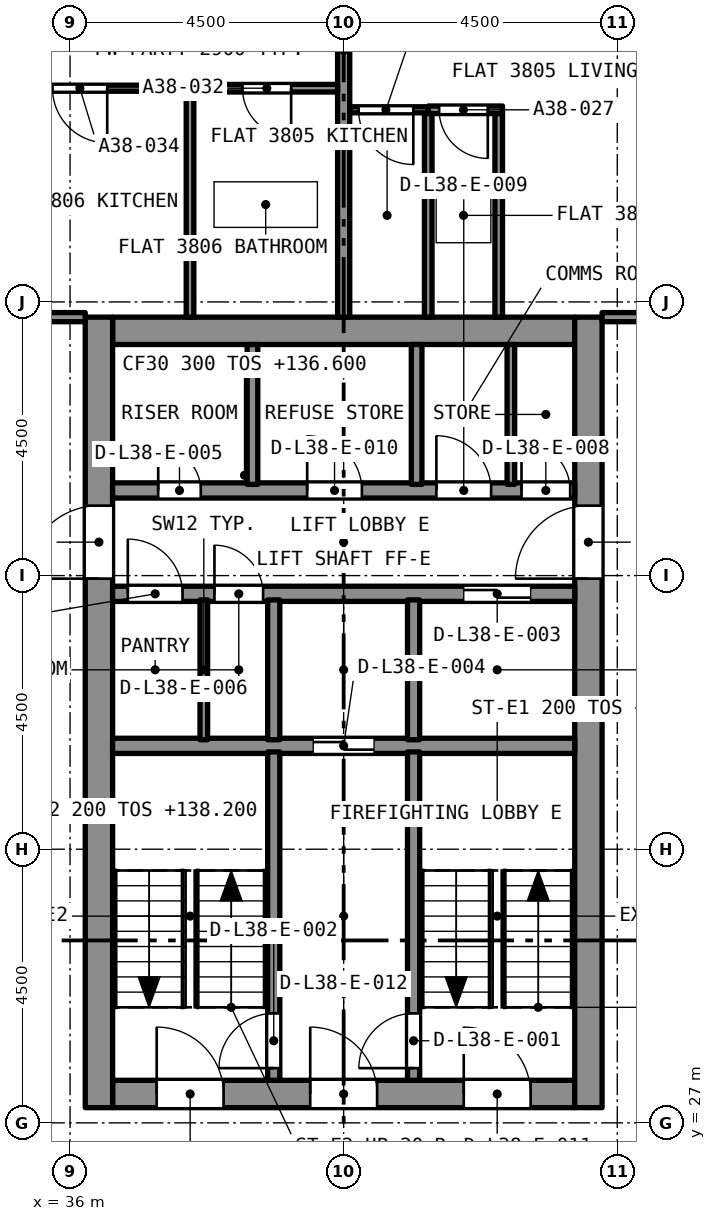
"""IFC4 building model, lengths in metres.
Left out: names, types, materials, properties, quantities, classifications, styles, units other than length and angle.
Written with IfcOpenShell. Run it as: python <this file> out.ifc"""

import sys

from ifc_helpers import new_model, si_unit, direction, frame, frame_2d, origin, place, context, subcontext, project, spatial, rectangle, extrude, element, fill, save


model = new_model("IFC4")
c1 = context("Model", 3, precision=1e-05, world=origin(), true_north=direction((0.0, 1.0)))
c2 = subcontext(c1, "Body", "Model", "MODEL_VIEW")
j1 = project(units=[si_unit("LENGTHUNIT", "METRE"), si_unit("PLANEANGLEUNIT", "RADIAN")], contexts=[c1])
p1 = place(None, origin())
s1 = spatial("IfcSite", under=j1, at=p1, CompositionType="ELEMENT")
p2 = place(p1, origin())
s2 = spatial("IfcBuilding", under=s1, at=p2, CompositionType="ELEMENT")
p3 = place(p2, frame((0.0, 0.0, 136.6)))
s3 = spatial("IfcBuildingStorey", under=s2, at=p3, CompositionType="ELEMENT", Elevation=136.6)
p4 = place(p3, frame((36.7, 27.475, 0.0), z_axis=(0.0, 0.0, 1.0), x_axis=(1.0, 0.0, 0.0)))
e1 = element("IfcWall", 1, at=p4, inside=s3, PredefinedType="SOLIDWALL", context=c2, shape_type="SweptSolid", body=[
    extrude(rectangle(XDim=7.6, YDim=0.45, at=frame_2d((3.8, 0.0))), origin(), (0.0, 0.0, 1.0), 3.2),
])
p5 = place(p4, frame((5.775, 0.0, 0.0)))
e2 = element("IfcOpeningElement", 2, at=p5, cuts=e1, PredefinedType="OPENING", context=c2, shape_type="SweptSolid", body=[
    extrude(rectangle(XDim=1.1, YDim=2.1, at=frame_2d((0.55, 1.05))), frame((0.0, 0.235, 0.0), z_axis=(0.0, -1.0, 0.0), x_axis=(1.0, 0.0, 0.0)), (0.0, 0.0, 1.0), 0.47),
])
p6 = place(p4, frame((3.25, 0.0, 0.0)))
e3 = element("IfcOpeningElement", 3, at=p6, cuts=e1, PredefinedType="OPENING", context=c2, shape_type="SweptSolid", body=[
    extrude(rectangle(XDim=1.1, YDim=2.1, at=frame_2d((0.55, 1.05))), frame((0.0, 0.235, 0.0), z_axis=(0.0, -1.0, 0.0), x_axis=(1.0, 0.0, 0.0)), (0.0, 0.0, 1.0), 0.47),
])
p7 = place(p4, frame((0.725, 0.0, 0.0)))
e4 = element("IfcOpeningElement", 4, at=p7, cuts=e1, PredefinedType="OPENING", context=c2, shape_type="SweptSolid", body=[
    extrude(rectangle(XDim=1.1, YDim=2.1, at=frame_2d((0.55, 1.05))), frame((0.0, 0.235, 0.0), z_axis=(0.0, -1.0, 0.0), x_axis=(1.0, 0.0, 0.0)), (0.0, 0.0, 1.0), 0.47),
])
p8 = place(p3, frame((36.7, 40.025, 0.0), z_axis=(0.0, 0.0, 1.0), x_axis=(1.0, 0.0, 0.0)))
e5 = element("IfcWall", 5, at=p8, inside=s3, PredefinedType="SOLIDWALL", context=c2, shape_type="SweptSolid", body=[
    extrude(rectangle(XDim=7.6, YDim=0.45, at=frame_2d((3.8, 0.0))), origin(), (0.0, 0.0, 1.0), 3.2),
])
p9 = place(p3, frame((36.475, 27.25, 0.0), z_axis=(0.0, 0.0, 1.0), x_axis=(0.0, 1.0, 0.0)))
e6 = element("IfcWall", 6, at=p9, inside=s3, PredefinedType="SOLIDWALL", context=c2, shape_type="SweptSolid", body=[
    extrude(rectangle(XDim=13.0, YDim=0.45, at=frame_2d((6.5, 0.0))), origin(), (0.0, 0.0, 1.0), 3.2),
])
p10 = place(p9, frame((8.7, 0.0, 0.0)))
e7 = element("IfcOpeningElement", 7, at=p10, cuts=e6, PredefinedType="OPENING", context=c2, shape_type="SweptSolid", body=[
    extrude(rectangle(XDim=1.2, YDim=2.1, at=frame_2d((0.6, 1.05))), frame((0.0, 0.235, 0.0), z_axis=(0.0, -1.0, 0.0), x_axis=(1.0, 0.0, 0.0)), (0.0, 0.0, 1.0), 0.47),
])
p11 = place(p3, frame((44.525, 27.25, 0.0), z_axis=(0.0, 0.0, 1.0), x_axis=(0.0, 1.0, 0.0)))
e8 = element("IfcWall", 8, at=p11, inside=s3, PredefinedType="SOLIDWALL", context=c2, shape_type="SweptSolid", body=[
    extrude(rectangle(XDim=13.0, YDim=0.45, at=frame_2d((6.5, 0.0))), origin(), (0.0, 0.0, 1.0), 3.2),
])
p12 = place(p11, frame((8.7, 0.0, 0.0)))
e9 = element("IfcOpeningElement", 9, at=p12, cuts=e8, PredefinedType="OPENING", context=c2, shape_type="SweptSolid", body=[
    extrude(rectangle(XDim=1.2, YDim=2.1, at=frame_2d((0.6, 1.05))), frame((0.0, 0.235, 0.0), z_axis=(0.0, -1.0, 0.0), x_axis=(1.0, 0.0, 0.0)), (0.0, 0.0, 1.0), 0.47),
])
p13 = place(p3, frame((43.113, 43.66, 0.0), z_axis=(0.0, 0.0, 1.0), x_axis=(-1.0, 0.0, 0.0)))
e10 = element("IfcWall", 10, at=p13, inside=s3, PredefinedType="PARTITIONING", context=c2, shape_type="SweptSolid", body=[
    extrude(rectangle(XDim=1.222, YDim=0.125, at=frame_2d((0.611, 0.0))), origin(), (0.0, 0.0, 1.0), 2.9),
])
p14 = place(p13, frame((0.242, 0.0, 0.0)))
e11 = element("IfcOpeningElement", 11, at=p14, cuts=e10, PredefinedType="OPENING", context=c2, shape_type="SweptSolid", body=[
    extrude(rectangle(XDim=0.8, YDim=2.1, at=frame_2d((0.4, 1.05))), frame((0.0, 0.073, 0.0), z_axis=(0.0, -1.0, 0.0), x_axis=(1.0, 0.0, 0.0)), (0.0, 0.0, 1.0), 0.145),
])
for number, where, z_axis, x_axis in (
    (12, (43.05, 40.25, 0.0), (0.0, 0.0, 1.0), (0.0, 1.0, 0.0)),
    (13, (41.891, 40.25, 0.0), (0.0, 0.0, 1.0), (0.0, 1.0, 0.0)),
):
    element("IfcWall", number, at=place(p3, frame(where, z_axis=z_axis, x_axis=x_axis)), inside=s3, PredefinedType="PARTITIONING", context=c2, shape_type="SweptSolid", body=[
        extrude(rectangle(XDim=3.347, YDim=0.125, at=frame_2d((1.674, 0.0))), origin(), (0.0, 0.0, 1.0), 2.9),
    ])
p15 = place(p3, frame((41.891, 43.66, 0.0), z_axis=(0.0, 0.0, 1.0), x_axis=(-1.0, 0.0, 0.0)))
e14 = element("IfcWall", 14, at=p15, inside=s3, PredefinedType="PARTITIONING", context=c2, shape_type="SweptSolid", body=[
    extrude(rectangle(XDim=1.291, YDim=0.1, at=frame_2d((0.646, 0.0))), origin(), (0.0, 0.0, 1.0), 2.9),
])
p16 = place(p15, frame((0.246, 0.0, 0.0)))
e15 = element("IfcOpeningElement", 15, at=p16, cuts=e14, PredefinedType="OPENING", context=c2, shape_type="SweptSolid", body=[
    extrude(rectangle(XDim=0.9, YDim=2.1, at=frame_2d((0.45, 1.05))), frame((0.0, 0.06, 0.0), z_axis=(0.0, -1.0, 0.0), x_axis=(1.0, 0.0, 0.0)), (0.0, 0.0, 1.0), 0.12),
])
p17 = place(p3, frame((44.75, 40.25, 0.0), z_axis=(0.0, 0.0, 1.0), x_axis=(1.0, 0.0, 0.0)))
e16 = element("IfcWall", 16, at=p17, inside=s3, PredefinedType="PARTITIONING", context=c2, shape_type="SweptSolid", body=[
    extrude(rectangle(XDim=4.275, YDim=0.15, at=frame_2d((2.137, 0.0))), origin(), (0.0, 0.0, 1.0), 2.9),
])
p18 = place(p17, frame((2.0, 0.0, 0.0)))
e17 = element("IfcOpeningElement", 17, at=p18, cuts=e16, PredefinedType="OPENING", context=c2, shape_type="SweptSolid", body=[
    extrude(rectangle(XDim=1.0, YDim=2.1, at=frame_2d((0.5, 1.05))), frame((0.0, 0.085, 0.0), z_axis=(0.0, -1.0, 0.0), x_axis=(1.0, 0.0, 0.0)), (0.0, 0.0, 1.0), 0.17),
])
p19 = place(p3, frame((40.5, 40.25, 0.0), z_axis=(0.0, 0.0, 1.0), x_axis=(0.0, 1.0, 0.0)))
e18 = element("IfcWall", 18, at=p19, inside=s3, PredefinedType="PARTITIONING", context=c2, shape_type="SweptSolid", body=[
    extrude(rectangle(XDim=8.775, YDim=0.2, at=frame_2d((4.387, 0.0))), origin(), (0.0, 0.0, 1.0), 2.9),
])
p20 = place(p3, frame((40.4, 44.015, 0.0), z_axis=(0.0, 0.0, 1.0), x_axis=(-1.0, 0.0, 0.0)))
e19 = element("IfcWall", 19, at=p20, inside=s3, PredefinedType="PARTITIONING", context=c2, shape_type="SweptSolid", body=[
    extrude(rectangle(XDim=2.427, YDim=0.125, at=frame_2d((1.214, 0.0))), origin(), (0.0, 0.0, 1.0), 2.9),
])
p21 = place(p20, frame((0.764, 0.0, 0.0)))
e20 = element("IfcOpeningElement", 20, at=p21, cuts=e19, PredefinedType="OPENING", context=c2, shape_type="SweptSolid", body=[
    extrude(rectangle(XDim=0.8, YDim=2.1, at=frame_2d((0.4, 1.05))), frame((0.0, 0.073, 0.0), z_axis=(0.0, -1.0, 0.0), x_axis=(1.0, 0.0, 0.0)), (0.0, 0.0, 1.0), 0.145),
])
p22 = place(p3, frame((37.973, 40.25, 0.0), z_axis=(0.0, 0.0, 1.0), x_axis=(0.0, 1.0, 0.0)))
e21 = element("IfcWall", 21, at=p22, inside=s3, PredefinedType="PARTITIONING", context=c2, shape_type="SweptSolid", body=[
    extrude(rectangle(XDim=3.702, YDim=0.125, at=frame_2d((1.851, 0.0))), origin(), (0.0, 0.0, 1.0), 2.9),
])
p23 = place(p3, frame((37.973, 44.015, 0.0), z_axis=(0.0, 0.0, 1.0), x_axis=(-1.0, 0.0, 0.0)))
e22 = element("IfcWall", 22, at=p23, inside=s3, PredefinedType="PARTITIONING", context=c2, shape_type="SweptSolid", body=[
    extrude(rectangle(XDim=3.673, YDim=0.1, at=frame_2d((1.836, 0.0))), origin(), (0.0, 0.0, 1.0), 2.9),
])
p24 = place(p23, frame((1.361, 0.0, 0.0)))
e23 = element("IfcOpeningElement", 23, at=p24, cuts=e22, PredefinedType="OPENING", context=c2, shape_type="SweptSolid", body=[
    extrude(rectangle(XDim=0.9, YDim=2.1, at=frame_2d((0.45, 1.05))), frame((0.0, 0.06, 0.0), z_axis=(0.0, -1.0, 0.0), x_axis=(1.0, 0.0, 0.0)), (0.0, 0.0, 1.0), 0.12),
])
p25 = place(p3, frame((34.35, 40.25, 0.0), z_axis=(0.0, 0.0, 1.0), x_axis=(1.0, 0.0, 0.0)))
e24 = element("IfcWall", 24, at=p25, inside=s3, PredefinedType="PARTITIONING", context=c2, shape_type="SweptSolid", body=[
    extrude(rectangle(XDim=1.9, YDim=0.15, at=frame_2d((0.95, 0.0))), origin(), (0.0, 0.0, 1.0), 2.9),
])
p26 = place(p3, frame((36.7, 33.2, 0.0), z_axis=(0.0, 0.0, 1.0), x_axis=(1.0, 0.0, 0.0)))
e25 = element("IfcWall", 25, at=p26, inside=s3, PredefinedType="SOLIDWALL", context=c2, shape_type="SweptSolid", body=[
    extrude(rectangle(XDim=7.6, YDim=0.25, at=frame_2d((3.8, 0.0))), origin(), (0.0, 0.0, 1.0), 2.9),
])
p27 = place(p26, frame((3.3, 0.0, 0.0)))
e26 = element("IfcOpeningElement", 26, at=p27, cuts=e25, PredefinedType="OPENING", context=c2, shape_type="SweptSolid", body=[
    extrude(rectangle(XDim=1.0, YDim=2.1, at=frame_2d((0.5, 1.05))), frame((0.0, 0.135, 0.0), z_axis=(0.0, -1.0, 0.0), x_axis=(1.0, 0.0, 0.0)), (0.0, 0.0, 1.0), 0.27),
])
p28 = place(p3, frame((36.7, 35.7, 0.0), z_axis=(0.0, 0.0, 1.0), x_axis=(1.0, 0.0, 0.0)))
e27 = element("IfcWall", 27, at=p28, inside=s3, PredefinedType="SOLIDWALL", context=c2, shape_type="SweptSolid", body=[
    extrude(rectangle(XDim=7.6, YDim=0.25, at=frame_2d((3.8, 0.0))), origin(), (0.0, 0.0, 1.0), 2.9),
])
p29 = place(p28, frame((5.775, 0.0, 0.0)))
e28 = element("IfcOpeningElement", 28, at=p29, cuts=e27, PredefinedType="OPENING", context=c2, shape_type="SweptSolid", body=[
    extrude(rectangle(XDim=1.1, YDim=2.4, at=frame_2d((0.55, 1.2))), frame((0.0, 0.135, 0.0), z_axis=(0.0, -1.0, 0.0), x_axis=(1.0, 0.0, 0.0)), (0.0, 0.0, 1.0), 0.27),
])
p30 = place(p28, frame((1.675, 0.0, 0.0)))
e29 = element("IfcOpeningElement", 29, at=p30, cuts=e27, PredefinedType="OPENING", context=c2, shape_type="SweptSolid", body=[
    extrude(rectangle(XDim=0.8, YDim=2.1, at=frame_2d((0.4, 1.05))), frame((0.0, 0.135, 0.0), z_axis=(0.0, -1.0, 0.0), x_axis=(1.0, 0.0, 0.0)), (0.0, 0.0, 1.0), 0.27),
])
p31 = place(p28, frame((0.25, 0.0, 0.0)))
e30 = element("IfcOpeningElement", 30, at=p31, cuts=e27, PredefinedType="OPENING", context=c2, shape_type="SweptSolid", body=[
    extrude(rectangle(XDim=0.9, YDim=2.1, at=frame_2d((0.45, 1.05))), frame((0.0, 0.135, 0.0), z_axis=(0.0, -1.0, 0.0), x_axis=(1.0, 0.0, 0.0)), (0.0, 0.0, 1.0), 0.27),
])
p32 = place(p3, frame((36.7, 37.4, 0.0), z_axis=(0.0, 0.0, 1.0), x_axis=(1.0, 0.0, 0.0)))
e31 = element("IfcWall", 31, at=p32, inside=s3, PredefinedType="SOLIDWALL", context=c2, shape_type="SweptSolid", body=[
    extrude(rectangle(XDim=7.6, YDim=0.25, at=frame_2d((3.8, 0.0))), origin(), (0.0, 0.0, 1.0), 2.9),
])
p33 = place(p32, frame((0.75, 0.0, 0.0)))
e32 = element("IfcOpeningElement", 32, at=p33, cuts=e31, PredefinedType="OPENING", context=c2, shape_type="SweptSolid", body=[
    extrude(rectangle(XDim=0.7, YDim=2.1, at=frame_2d((0.35, 1.05))), frame((0.0, 0.135, 0.0), z_axis=(0.0, -1.0, 0.0), x_axis=(1.0, 0.0, 0.0)), (0.0, 0.0, 1.0), 0.27),
])
p34 = place(p32, frame((6.725, 0.0, 0.0)))
e33 = element("IfcOpeningElement", 33, at=p34, cuts=e31, PredefinedType="OPENING", context=c2, shape_type="SweptSolid", body=[
    extrude(rectangle(XDim=0.8, YDim=2.1, at=frame_2d((0.4, 1.05))), frame((0.0, 0.135, 0.0), z_axis=(0.0, -1.0, 0.0), x_axis=(1.0, 0.0, 0.0)), (0.0, 0.0, 1.0), 0.27),
])
p35 = place(p32, frame((5.325, 0.0, 0.0)))
e34 = element("IfcOpeningElement", 34, at=p35, cuts=e31, PredefinedType="OPENING", context=c2, shape_type="SweptSolid", body=[
    extrude(rectangle(XDim=0.9, YDim=2.1, at=frame_2d((0.45, 1.05))), frame((0.0, 0.135, 0.0), z_axis=(0.0, -1.0, 0.0), x_axis=(1.0, 0.0, 0.0)), (0.0, 0.0, 1.0), 0.27),
])
p36 = place(p32, frame((3.2, 0.0, 0.0)))
e35 = element("IfcOpeningElement", 35, at=p36, cuts=e31, PredefinedType="OPENING", context=c2, shape_type="SweptSolid", body=[
    extrude(rectangle(XDim=0.9, YDim=2.1, at=frame_2d((0.45, 1.05))), frame((0.0, 0.135, 0.0), z_axis=(0.0, -1.0, 0.0), x_axis=(1.0, 0.0, 0.0)), (0.0, 0.0, 1.0), 0.27),
])
p37 = place(p3, frame((41.65, 27.7, 0.0), z_axis=(0.0, 0.0, 1.0), x_axis=(0.0, 1.0, 0.0)))
e36 = element("IfcWall", 36, at=p37, inside=s3, PredefinedType="SOLIDWALL", context=c2, shape_type="SweptSolid", body=[
    extrude(rectangle(XDim=5.4, YDim=0.2, at=frame_2d((2.7, 0.0))), origin(), (0.0, 0.0, 1.0), 2.9),
])
p38 = place(p37, frame((0.2, 0.0, 0.0)))
e37 = element("IfcOpeningElement", 37, at=p38, cuts=e36, PredefinedType="OPENING", context=c2, shape_type="SweptSolid", body=[
    extrude(rectangle(XDim=0.9, YDim=2.1, at=frame_2d((0.45, 1.05))), frame((0.0, 0.11, 0.0), z_axis=(0.0, -1.0, 0.0), x_axis=(1.0, 0.0, 0.0)), (0.0, 0.0, 1.0), 0.22),
])
p39 = place(p3, frame((39.35, 27.7, 0.0), z_axis=(0.0, 0.0, 1.0), x_axis=(0.0, 1.0, 0.0)))
e38 = element("IfcWall", 38, at=p39, inside=s3, PredefinedType="SOLIDWALL", context=c2, shape_type="SweptSolid", body=[
    extrude(rectangle(XDim=5.4, YDim=0.2, at=frame_2d((2.7, 0.0))), origin(), (0.0, 0.0, 1.0), 2.9),
])
p40 = place(p39, frame((0.2, 0.0, 0.0)))
e39 = element("IfcOpeningElement", 39, at=p40, cuts=e38, PredefinedType="OPENING", context=c2, shape_type="SweptSolid", body=[
    extrude(rectangle(XDim=0.9, YDim=2.1, at=frame_2d((0.45, 1.05))), frame((0.0, 0.11, 0.0), z_axis=(0.0, -1.0, 0.0), x_axis=(1.0, 0.0, 0.0)), (0.0, 0.0, 1.0), 0.22),
])
for number, where, z_axis, x_axis in (
    (40, (41.65, 33.3, 0.0), (0.0, 0.0, 1.0), (0.0, 1.0, 0.0)),
    (41, (39.35, 33.3, 0.0), (0.0, 0.0, 1.0), (0.0, 1.0, 0.0)),
):
    element("IfcWall", number, at=place(p3, frame(where, z_axis=z_axis, x_axis=x_axis)), inside=s3, PredefinedType="SOLIDWALL", context=c2, shape_type="SweptSolid", body=[
        extrude(rectangle(XDim=2.3, YDim=0.2, at=frame_2d((1.15, 0.0))), origin(), (0.0, 0.0, 1.0), 2.9),
    ])
for number, where, z_axis, x_axis in (
    (42, (41.7, 37.5, 0.0), (0.0, 0.0, 1.0), (0.0, 1.0, 0.0)),
    (43, (39.0, 37.5, 0.0), (0.0, 0.0, 1.0), (0.0, 1.0, 0.0)),
):
    element("IfcWall", number, at=place(p3, frame(where, z_axis=z_axis, x_axis=x_axis)), inside=s3, PredefinedType="SOLIDWALL", context=c2, shape_type="SweptSolid", body=[
        extrude(rectangle(XDim=2.3, YDim=0.175, at=frame_2d((1.15, 0.0))), origin(), (0.0, 0.0, 1.0), 2.9),
    ])
for number, where, z_axis, x_axis in (
    (44, (38.2, 33.3, 0.0), (0.0, 0.0, 1.0), (0.0, 1.0, 0.0)),
    (45, (43.25, 37.5, 0.0), (0.0, 0.0, 1.0), (0.0, 1.0, 0.0)),
):
    element("IfcWall", number, at=place(p3, frame(where, z_axis=z_axis, x_axis=x_axis)), inside=s3, PredefinedType="PARTITIONING", context=c2, shape_type="SweptSolid", body=[
        extrude(rectangle(XDim=2.3, YDim=0.125, at=frame_2d((1.15, 0.0))), origin(), (0.0, 0.0, 1.0), 2.9),
    ])
p41 = place(p14, origin())
e46 = element("IfcDoor", 46, at=p41, inside=s3, OperationType="SINGLE_SWING_RIGHT", PredefinedType="DOOR", context=c2, shape_type="SweptSolid", body=[
    extrude(rectangle(XDim=0.8, YDim=2.1, at=frame_2d((0.4, 1.05))), frame((0.0, 0.025, 0.0), z_axis=(0.0, -1.0, 0.0), x_axis=(1.0, 0.0, 0.0)), (0.0, 0.0, 1.0), 0.05),
])
fill(e11, e46)
p42 = place(p16, origin())
e47 = element("IfcDoor", 47, at=p42, inside=s3, OperationType="SINGLE_SWING_RIGHT", PredefinedType="DOOR", context=c2, shape_type="SweptSolid", body=[
    extrude(rectangle(XDim=0.9, YDim=2.1, at=frame_2d((0.45, 1.05))), frame((0.0, 0.025, 0.0), z_axis=(0.0, -1.0, 0.0), x_axis=(1.0, 0.0, 0.0)), (0.0, 0.0, 1.0), 0.05),
])
fill(e15, e47)
p43 = place(p21, origin())
e48 = element("IfcDoor", 48, at=p43, inside=s3, OperationType="SINGLE_SWING_LEFT", PredefinedType="DOOR", context=c2, shape_type="SweptSolid", body=[
    extrude(rectangle(XDim=0.8, YDim=2.1, at=frame_2d((0.4, 1.05))), frame((0.0, 0.025, 0.0), z_axis=(0.0, -1.0, 0.0), x_axis=(1.0, 0.0, 0.0)), (0.0, 0.0, 1.0), 0.05),
])
fill(e20, e48)
p44 = place(p24, origin())
e49 = element("IfcDoor", 49, at=p44, inside=s3, OperationType="SINGLE_SWING_LEFT", PredefinedType="DOOR", context=c2, shape_type="SweptSolid", body=[
    extrude(rectangle(XDim=0.9, YDim=2.1, at=frame_2d((0.45, 1.05))), frame((0.0, 0.025, 0.0), z_axis=(0.0, -1.0, 0.0), x_axis=(1.0, 0.0, 0.0)), (0.0, 0.0, 1.0), 0.05),
])
fill(e23, e49)
p45 = place(p38, origin())
e50 = element("IfcDoor", 50, at=p45, inside=s3, OperationType="SINGLE_SWING_LEFT", PredefinedType="DOOR", context=c2, shape_type="SweptSolid", body=[
    extrude(rectangle(XDim=0.9, YDim=2.1, at=frame_2d((0.45, 1.05))), frame((0.0, 0.025, 0.0), z_axis=(0.0, -1.0, 0.0), x_axis=(1.0, 0.0, 0.0)), (0.0, 0.0, 1.0), 0.05),
])
fill(e37, e50)
p46 = place(p40, origin())
e51 = element("IfcDoor", 51, at=p46, inside=s3, OperationType="SINGLE_SWING_LEFT", PredefinedType="DOOR", context=c2, shape_type="SweptSolid", body=[
    extrude(rectangle(XDim=0.9, YDim=2.1, at=frame_2d((0.45, 1.05))), frame((0.0, 0.025, 0.0), z_axis=(0.0, -1.0, 0.0), x_axis=(1.0, 0.0, 0.0)), (0.0, 0.0, 1.0), 0.05),
])
fill(e39, e51)
p47 = place(p29, origin())
e52 = element("IfcDoor", 52, at=p47, inside=s3, OperationType="SLIDING_TO_LEFT", PredefinedType="DOOR", context=c2, shape_type="SweptSolid", body=[
    extrude(rectangle(XDim=1.1, YDim=2.4, at=frame_2d((0.55, 1.2))), frame((0.0, 0.025, 0.0), z_axis=(0.0, -1.0, 0.0), x_axis=(1.0, 0.0, 0.0)), (0.0, 0.0, 1.0), 0.05),
])
fill(e28, e52)
p48 = place(p27, origin())
e53 = element("IfcDoor", 53, at=p48, inside=s3, OperationType="SLIDING_TO_LEFT", PredefinedType="DOOR", context=c2, shape_type="SweptSolid", body=[
    extrude(rectangle(XDim=1.0, YDim=2.1, at=frame_2d((0.5, 1.05))), frame((0.0, 0.025, 0.0), z_axis=(0.0, -1.0, 0.0), x_axis=(1.0, 0.0, 0.0)), (0.0, 0.0, 1.0), 0.05),
])
fill(e26, e53)
p49 = place(p33, origin())
e54 = element("IfcDoor", 54, at=p49, inside=s3, OperationType="SINGLE_SWING_LEFT", PredefinedType="DOOR", context=c2, shape_type="SweptSolid", body=[
    extrude(rectangle(XDim=0.7, YDim=2.1, at=frame_2d((0.35, 1.05))), frame((0.0, 0.025, 0.0), z_axis=(0.0, -1.0, 0.0), x_axis=(1.0, 0.0, 0.0)), (0.0, 0.0, 1.0), 0.05),
])
fill(e32, e54)
p50 = place(p30, origin())
e55 = element("IfcDoor", 55, at=p50, inside=s3, OperationType="SINGLE_SWING_LEFT", PredefinedType="DOOR", context=c2, shape_type="SweptSolid", body=[
    extrude(rectangle(XDim=0.8, YDim=2.1, at=frame_2d((0.4, 1.05))), frame((0.0, 0.025, 0.0), z_axis=(0.0, -1.0, 0.0), x_axis=(1.0, 0.0, 0.0)), (0.0, 0.0, 1.0), 0.05),
])
fill(e29, e55)
p51 = place(p31, origin())
e56 = element("IfcDoor", 56, at=p51, inside=s3, OperationType="SINGLE_SWING_LEFT", PredefinedType="DOOR", context=c2, shape_type="SweptSolid", body=[
    extrude(rectangle(XDim=0.9, YDim=2.1, at=frame_2d((0.45, 1.05))), frame((0.0, 0.025, 0.0), z_axis=(0.0, -1.0, 0.0), x_axis=(1.0, 0.0, 0.0)), (0.0, 0.0, 1.0), 0.05),
])
fill(e30, e56)
p52 = place(p34, origin())
e57 = element("IfcDoor", 57, at=p52, inside=s3, OperationType="SINGLE_SWING_LEFT", PredefinedType="DOOR", context=c2, shape_type="SweptSolid", body=[
    extrude(rectangle(XDim=0.8, YDim=2.1, at=frame_2d((0.4, 1.05))), frame((0.0, 0.025, 0.0), z_axis=(0.0, -1.0, 0.0), x_axis=(1.0, 0.0, 0.0)), (0.0, 0.0, 1.0), 0.05),
])
fill(e33, e57)
p53 = place(p35, origin())
e58 = element("IfcDoor", 58, at=p53, inside=s3, OperationType="SINGLE_SWING_LEFT", PredefinedType="DOOR", context=c2, shape_type="SweptSolid", body=[
    extrude(rectangle(XDim=0.9, YDim=2.1, at=frame_2d((0.45, 1.05))), frame((0.0, 0.025, 0.0), z_axis=(0.0, -1.0, 0.0), x_axis=(1.0, 0.0, 0.0)), (0.0, 0.0, 1.0), 0.05),
])
fill(e34, e58)
p54 = place(p36, origin())
e59 = element("IfcDoor", 59, at=p54, inside=s3, OperationType="SINGLE_SWING_LEFT", PredefinedType="DOOR", context=c2, shape_type="SweptSolid", body=[
    extrude(rectangle(XDim=0.9, YDim=2.1, at=frame_2d((0.45, 1.05))), frame((0.0, 0.025, 0.0), z_axis=(0.0, -1.0, 0.0), x_axis=(1.0, 0.0, 0.0)), (0.0, 0.0, 1.0), 0.05),
])
fill(e35, e59)
p55 = place(p5, origin())
e60 = element("IfcDoor", 60, at=p55, inside=s3, OperationType="SINGLE_SWING_LEFT", PredefinedType="DOOR", context=c2, shape_type="SweptSolid", body=[
    extrude(rectangle(XDim=1.1, YDim=2.1, at=frame_2d((0.55, 1.05))), frame((0.0, 0.025, 0.0), z_axis=(0.0, -1.0, 0.0), x_axis=(1.0, 0.0, 0.0)), (0.0, 0.0, 1.0), 0.05),
])
fill(e2, e60)
p56 = place(p6, origin())
e61 = element("IfcDoor", 61, at=p56, inside=s3, OperationType="SINGLE_SWING_LEFT", PredefinedType="DOOR", context=c2, shape_type="SweptSolid", body=[
    extrude(rectangle(XDim=1.1, YDim=2.1, at=frame_2d((0.55, 1.05))), frame((0.0, 0.025, 0.0), z_axis=(0.0, -1.0, 0.0), x_axis=(1.0, 0.0, 0.0)), (0.0, 0.0, 1.0), 0.05),
])
fill(e3, e61)
p57 = place(p7, origin())
e62 = element("IfcDoor", 62, at=p57, inside=s3, OperationType="SINGLE_SWING_LEFT", PredefinedType="DOOR", context=c2, shape_type="SweptSolid", body=[
    extrude(rectangle(XDim=1.1, YDim=2.1, at=frame_2d((0.55, 1.05))), frame((0.0, 0.025, 0.0), z_axis=(0.0, -1.0, 0.0), x_axis=(1.0, 0.0, 0.0)), (0.0, 0.0, 1.0), 0.05),
])
fill(e4, e62)
p58 = place(p10, origin())
e63 = element("IfcDoor", 63, at=p58, inside=s3, OperationType="SINGLE_SWING_LEFT", PredefinedType="DOOR", context=c2, shape_type="SweptSolid", body=[
    extrude(rectangle(XDim=1.2, YDim=2.1, at=frame_2d((0.6, 1.05))), frame((0.0, 0.025, 0.0), z_axis=(0.0, -1.0, 0.0), x_axis=(1.0, 0.0, 0.0)), (0.0, 0.0, 1.0), 0.05),
])
fill(e7, e63)
p59 = place(p12, origin())
e64 = element("IfcDoor", 64, at=p59, inside=s3, OperationType="SINGLE_SWING_LEFT", PredefinedType="DOOR", context=c2, shape_type="SweptSolid", body=[
    extrude(rectangle(XDim=1.2, YDim=2.1, at=frame_2d((0.6, 1.05))), frame((0.0, 0.025, 0.0), z_axis=(0.0, -1.0, 0.0), x_axis=(1.0, 0.0, 0.0)), (0.0, 0.0, 1.0), 0.05),
])
fill(e9, e64)
save(model, sys.argv[1])
